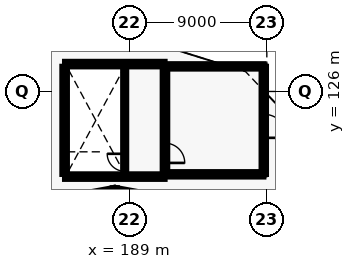
"""IFC4 building model, lengths in metres.
Left out: names, types, materials, properties, quantities, classifications, styles, units other than length and angle.
Written with IfcOpenShell. Run it as: python <this file> out.ifc"""

import sys

from ifc_helpers import new_model, si_unit, direction, frame, frame_2d, origin, origin_2d, place, context, subcontext, project, spatial, rectangle, hollow_circle, extrude, element, fill, save


model = new_model("IFC4")
c1 = context("Model", 3, precision=1e-05, world=origin(), true_north=direction((0.0, 1.0)))
c2 = subcontext(c1, "Body", "Model", "MODEL_VIEW")
j1 = project(units=[si_unit("LENGTHUNIT", "METRE"), si_unit("PLANEANGLEUNIT", "RADIAN")], contexts=[c1])
p1 = place(None, origin())
s1 = spatial("IfcSite", under=j1, at=p1, CompositionType="ELEMENT")
p2 = place(p1, origin())
s2 = spatial("IfcBuilding", under=s1, at=p2, CompositionType="ELEMENT")
p3 = place(p2, frame((0.0, 0.0, 9.6)))
s3 = spatial("IfcBuildingStorey", under=s2, at=p3, CompositionType="ELEMENT", Elevation=9.6)
p4 = place(p3, frame((188.0, 119.5, 0.0), z_axis=(0.0, 0.0, 1.0), x_axis=(0.0, 1.0, 0.0)))
e1 = element("IfcColumn", 1, at=p4, inside=s3, PredefinedType="COLUMN", context=c2, shape_type="SweptSolid", body=[
    extrude(hollow_circle(Radius=0.162, WallThickness=0.016, at=origin_2d()), origin(), (0.0, 0.0, 1.0), 2.38),
])
for number, where, z_axis, x_axis in (
    (2, (190.634, 119.02, 0.0), (0.0, 0.0, 1.0), (-0.983, 0.182, 0.0)),
    (3, (187.961, 119.5, 0.0), (0.0, 0.0, 1.0), (-0.983, -0.182, 0.0)),
):
    element("IfcWall", number, at=place(p3, frame(where, z_axis=z_axis, x_axis=x_axis)), inside=s3, PredefinedType="SOLIDWALL", context=c2, shape_type="SweptSolid", body=[
        extrude(rectangle(XDim=2.639, YDim=0.36, at=frame_2d((1.319, 0.0))), origin(), (0.0, 0.0, 1.0), 1.95),
    ])
for number, where, z_axis, x_axis in (
    (4, (191.45, 120.55, 0.0), (0.0, 0.0, 1.0), (1.0, 0.0, 0.0)),
    (5, (191.45, 127.65, 0.0), (0.0, 0.0, 1.0), (1.0, 0.0, 0.0)),
):
    element("IfcWall", number, at=place(p3, frame(where, z_axis=z_axis, x_axis=x_axis)), inside=s3, PredefinedType="SOLIDWALL", context=c2, shape_type="SweptSolid", body=[
        extrude(rectangle(XDim=6.35, YDim=0.34, at=frame_2d((3.175, 0.0))), origin(), (0.0, 0.0, 1.0), 2.6),
    ])
p5 = place(p3, frame((197.8, 120.55, 0.0), z_axis=(0.0, 0.0, 1.0), x_axis=(0.0, 1.0, 0.0)))
e6 = element("IfcWall", 6, at=p5, inside=s3, PredefinedType="SOLIDWALL", context=c2, shape_type="SweptSolid", body=[
    extrude(rectangle(XDim=7.1, YDim=0.34, at=frame_2d((3.55, 0.0))), origin(), (0.0, 0.0, 1.0), 2.6),
])
p6 = place(p5, frame((2.4, 0.0, 0.0)))
e7 = element("IfcOpeningElement", 7, at=p6, cuts=e6, PredefinedType="OPENING", context=c2, shape_type="SweptSolid", body=[
    extrude(rectangle(XDim=1.55, YDim=2.2, at=frame_2d((0.775, 1.1))), frame((0.0, 0.18, 0.0), z_axis=(0.0, -1.0, 0.0), x_axis=(1.0, 0.0, 0.0)), (0.0, 0.0, 1.0), 0.36),
])
for number, where, z_axis, x_axis in (
    (8, (184.7, 120.4, 0.0), (0.0, 0.0, 1.0), (1.0, 0.0, 0.0)),
    (9, (184.7, 127.8, 0.0), (0.0, 0.0, 1.0), (1.0, 0.0, 0.0)),
):
    element("IfcWall", number, at=place(p3, frame(where, z_axis=z_axis, x_axis=x_axis)), inside=s3, PredefinedType="SHEAR", context=c2, shape_type="SweptSolid", body=[
        extrude(rectangle(XDim=6.6, YDim=0.35, at=frame_2d((3.3, 0.0))), origin(), (0.0, 0.0, 1.0), 3.7),
    ])
p7 = place(p3, frame((184.7, 120.55, 0.0), z_axis=(0.0, 0.0, 1.0), x_axis=(0.0, 1.0, 0.0)))
e10 = element("IfcWall", 10, at=p7, inside=s3, PredefinedType="SHEAR", context=c2, shape_type="SweptSolid", body=[
    extrude(rectangle(XDim=7.1, YDim=0.35, at=frame_2d((3.55, 0.0))), origin(), (0.0, 0.0, 1.0), 3.7),
])
p8 = place(p3, frame((191.3, 120.55, 0.0), z_axis=(0.0, 0.0, 1.0), x_axis=(0.0, 1.0, 0.0)))
e11 = element("IfcWall", 11, at=p8, inside=s3, PredefinedType="SHEAR", context=c2, shape_type="SweptSolid", body=[
    extrude(rectangle(XDim=7.1, YDim=0.35, at=frame_2d((3.55, 0.0))), origin(), (0.0, 0.0, 1.0), 3.7),
])
p9 = place(p8, frame((0.75, 0.0, 0.0)))
e12 = element("IfcOpeningElement", 12, at=p9, cuts=e11, PredefinedType="OPENING", context=c2, shape_type="SweptSolid", body=[
    extrude(rectangle(XDim=1.3, YDim=2.15, at=frame_2d((0.65, 1.075))), frame((0.0, 0.185, 0.0), z_axis=(0.0, -1.0, 0.0), x_axis=(1.0, 0.0, 0.0)), (0.0, 0.0, 1.0), 0.37),
])
p10 = place(p3, frame((188.65, 120.55, 0.0), z_axis=(0.0, 0.0, 1.0), x_axis=(0.0, 1.0, 0.0)))
e13 = element("IfcWall", 13, at=p10, inside=s3, PredefinedType="SHEAR", context=c2, shape_type="SweptSolid", body=[
    extrude(rectangle(XDim=7.1, YDim=0.25, at=frame_2d((3.55, 0.0))), origin(), (0.0, 0.0, 1.0), 3.7),
])
p11 = place(p10, frame((0.2, 0.0, 0.0)))
e14 = element("IfcOpeningElement", 14, at=p11, cuts=e13, PredefinedType="OPENING", context=c2, shape_type="SweptSolid", body=[
    extrude(rectangle(XDim=1.15, YDim=2.15, at=frame_2d((0.575, 1.075))), frame((0.0, 0.135, 0.0), z_axis=(0.0, -1.0, 0.0), x_axis=(1.0, 0.0, 0.0)), (0.0, 0.0, 1.0), 0.27),
])
p12 = place(p6, frame((1.55, 0.0, 0.0), z_axis=(0.0, 0.0, 1.0), x_axis=(-1.0, 0.0, 0.0)))
e15 = element("IfcDoor", 15, at=p12, inside=s3, OperationType="DOUBLE_DOOR_SINGLE_SWING", PredefinedType="DOOR", context=c2, shape_type="SweptSolid", body=[
    extrude(rectangle(XDim=1.55, YDim=2.2, at=frame_2d((0.775, 1.1))), frame((0.0, 0.025, 0.0), z_axis=(0.0, -1.0, 0.0), x_axis=(1.0, 0.0, 0.0)), (0.0, 0.0, 1.0), 0.05),
])
fill(e7, e15)
p13 = place(p9, frame((1.3, 0.0, 0.0), z_axis=(0.0, 0.0, 1.0), x_axis=(-1.0, 0.0, 0.0)))
e16 = element("IfcDoor", 16, at=p13, inside=s3, OperationType="DOUBLE_DOOR_SINGLE_SWING", PredefinedType="DOOR", context=c2, shape_type="SweptSolid", body=[
    extrude(rectangle(XDim=1.3, YDim=2.15, at=frame_2d((0.65, 1.075))), frame((0.0, 0.025, 0.0), z_axis=(0.0, -1.0, 0.0), x_axis=(1.0, 0.0, 0.0)), (0.0, 0.0, 1.0), 0.05),
])
fill(e12, e16)
p14 = place(p11, frame((1.15, 0.0, 0.0), z_axis=(0.0, 0.0, 1.0), x_axis=(-1.0, 0.0, 0.0)))
e17 = element("IfcDoor", 17, at=p14, inside=s3, OperationType="SINGLE_SWING_RIGHT", PredefinedType="DOOR", context=c2, shape_type="SweptSolid", body=[
    extrude(rectangle(XDim=1.15, YDim=2.15, at=frame_2d((0.575, 1.075))), frame((0.0, 0.025, 0.0), z_axis=(0.0, -1.0, 0.0), x_axis=(1.0, 0.0, 0.0)), (0.0, 0.0, 1.0), 0.05),
])
fill(e14, e17)
save(model, sys.argv[1])
